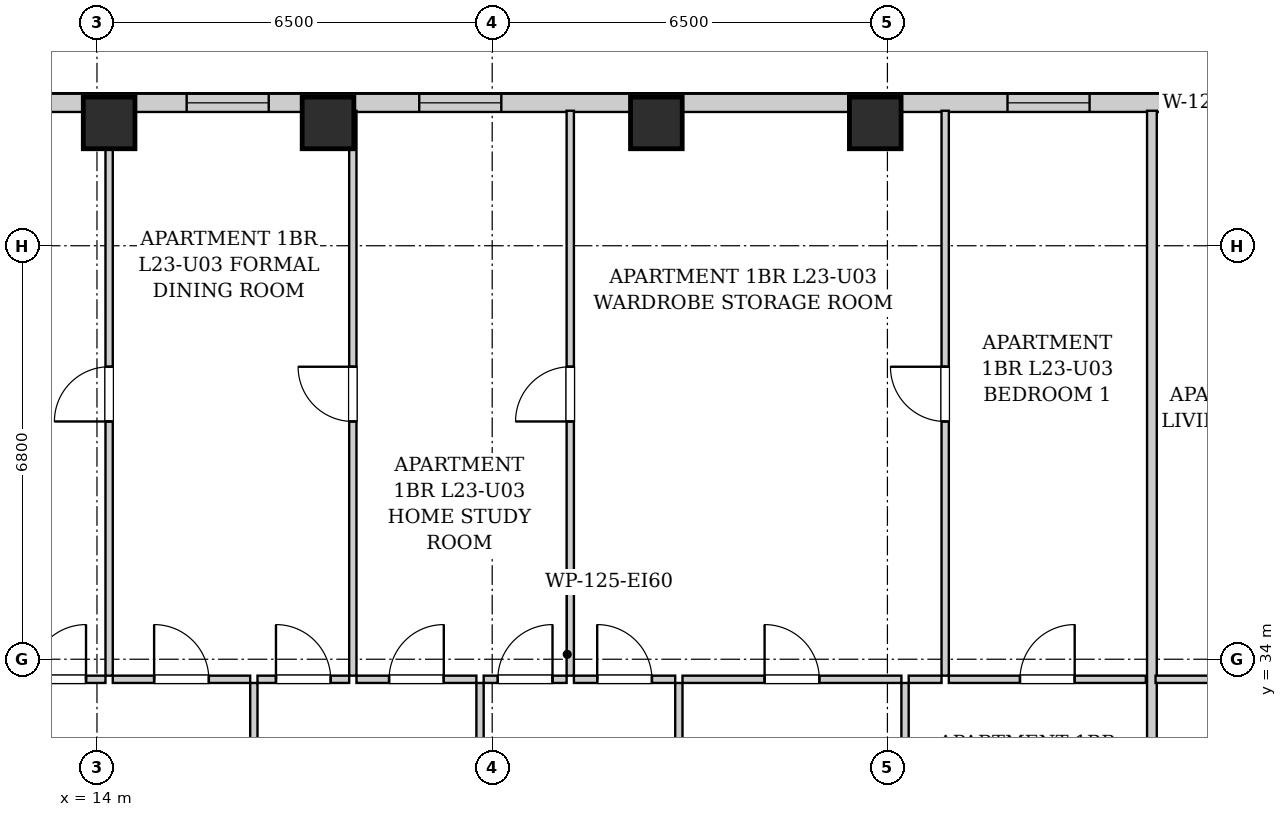
"""IFC4 building model, lengths in metres.
Left out: names, types, materials, properties, quantities, classifications, styles, units other than length and angle.
Written with IfcOpenShell. Run it as: python <this file> out.ifc"""

import sys

from ifc_helpers import new_model, si_unit, direction, frame, frame_2d, origin, origin_2d, place, context, subcontext, project, spatial, rectangle, extrude, element, fill, save


model = new_model("IFC4")
c1 = context("Model", 3, precision=1e-05, world=origin(), true_north=direction((0.0, 1.0)))
c2 = subcontext(c1, "Body", "Model", "MODEL_VIEW")
j1 = project(units=[si_unit("LENGTHUNIT", "METRE"), si_unit("PLANEANGLEUNIT", "RADIAN")], contexts=[c1])
p1 = place(None, origin())
s1 = spatial("IfcSite", under=j1, at=p1, CompositionType="ELEMENT")
p2 = place(p1, origin())
s2 = spatial("IfcBuilding", under=s1, at=p2, CompositionType="ELEMENT")
p3 = place(p2, frame((0.0, 0.0, 84.7)))
s3 = spatial("IfcBuildingStorey", under=s2, at=p3, CompositionType="ELEMENT", Elevation=84.7)
for number, where, z_axis, x_axis in (
    (1, (14.2, 42.82, 0.0), (0.0, 0.0, 1.0), (1.0, 0.0, 0.0)),
    (2, (17.8, 42.82, 0.0), (0.0, 0.0, 1.0), (1.0, 0.0, 0.0)),
    (3, (23.2, 42.82, 0.0), (0.0, 0.0, 1.0), (1.0, 0.0, 0.0)),
    (4, (26.8, 42.82, 0.0), (0.0, 0.0, 1.0), (1.0, 0.0, 0.0)),
):
    element("IfcColumn", number, at=place(p3, frame(where, z_axis=z_axis, x_axis=x_axis)), inside=s3, PredefinedType="COLUMN", context=c2, shape_type="SweptSolid", body=[
        extrude(rectangle(XDim=0.85, YDim=0.85, at=origin_2d()), origin(), (0.0, 0.0, 1.0), 3.2),
    ])
p4 = place(p3, frame((10.0, 43.15, 0.0), z_axis=(0.0, 0.0, 1.0), x_axis=(1.0, 0.0, 0.0)))
e5 = element("IfcWall", 5, at=p4, inside=s3, PredefinedType="SOLIDWALL", context=c2, shape_type="SweptSolid", body=[
    extrude(rectangle(XDim=22.5, YDim=0.3, at=frame_2d((11.25, 0.0))), origin(), (0.0, 0.0, 1.0), 2.94),
])
p5 = place(p4, frame((5.475, 0.0, 0.55)))
e6 = element("IfcOpeningElement", 6, at=p5, cuts=e5, PredefinedType="OPENING", context=c2, shape_type="SweptSolid", body=[
    extrude(rectangle(XDim=1.35, YDim=1.2, at=frame_2d((0.675, 0.6))), frame((0.0, 0.16, 0.0), z_axis=(0.0, -1.0, 0.0), x_axis=(1.0, 0.0, 0.0)), (0.0, 0.0, 1.0), 0.32),
])
p6 = place(p4, frame((9.3, 0.0, 0.55)))
e7 = element("IfcOpeningElement", 7, at=p6, cuts=e5, PredefinedType="OPENING", context=c2, shape_type="SweptSolid", body=[
    extrude(rectangle(XDim=1.35, YDim=1.2, at=frame_2d((0.675, 0.6))), frame((0.0, 0.16, 0.0), z_axis=(0.0, -1.0, 0.0), x_axis=(1.0, 0.0, 0.0)), (0.0, 0.0, 1.0), 0.32),
])
p7 = place(p4, frame((18.975, 0.0, 0.55)))
e8 = element("IfcOpeningElement", 8, at=p7, cuts=e5, PredefinedType="OPENING", context=c2, shape_type="SweptSolid", body=[
    extrude(rectangle(XDim=1.35, YDim=1.2, at=frame_2d((0.675, 0.6))), frame((0.0, 0.16, 0.0), z_axis=(0.0, -1.0, 0.0), x_axis=(1.0, 0.0, 0.0)), (0.0, 0.0, 1.0), 0.32),
])
p8 = place(p4, frame((21.59, 0.0, 0.55)))
e9 = element("IfcOpeningElement", 9, at=p8, cuts=e5, PredefinedType="OPENING", context=c2, shape_type="SweptSolid", body=[
    extrude(rectangle(XDim=0.68, YDim=1.2, at=frame_2d((0.34, 0.6))), frame((0.0, 0.16, 0.0), z_axis=(0.0, -1.0, 0.0), x_axis=(1.0, 0.0, 0.0)), (0.0, 0.0, 1.0), 0.32),
])
p9 = place(p3, frame((16.58, 30.76, 0.0), z_axis=(0.0, 0.0, 1.0), x_axis=(0.0, 1.0, 0.0)))
e10 = element("IfcWall", 10, at=p9, inside=s3, PredefinedType="PARTITIONING", context=c2, shape_type="SweptSolid", body=[
    extrude(rectangle(XDim=2.85, YDim=0.12, at=frame_2d((1.425, 0.0))), origin(), (0.0, 0.0, 1.0), 2.94),
])
p10 = place(p9, frame((0.975, 0.0, 0.0)))
e11 = element("IfcOpeningElement", 11, at=p10, cuts=e10, PredefinedType="OPENING", context=c2, shape_type="SweptSolid", body=[
    extrude(rectangle(XDim=0.9, YDim=2.05, at=frame_2d((0.45, 1.025))), frame((0.0, 0.07, 0.0), z_axis=(0.0, -1.0, 0.0), x_axis=(1.0, 0.0, 0.0)), (0.0, 0.0, 1.0), 0.14),
])
p11 = place(p3, frame((12.6, 33.67, 0.0), z_axis=(0.0, 0.0, 1.0), x_axis=(1.0, 0.0, 0.0)))
e12 = element("IfcWall", 12, at=p11, inside=s3, PredefinedType="PARTITIONING", context=c2, shape_type="SweptSolid", body=[
    extrude(rectangle(XDim=1.54, YDim=0.12, at=frame_2d((0.77, 0.0))), origin(), (0.0, 0.0, 1.0), 2.94),
])
p12 = place(p11, frame((0.32, 0.0, 0.0)))
e13 = element("IfcOpeningElement", 13, at=p12, cuts=e12, PredefinedType="OPENING", context=c2, shape_type="SweptSolid", body=[
    extrude(rectangle(XDim=0.9, YDim=2.05, at=frame_2d((0.45, 1.025))), frame((0.0, 0.07, 0.0), z_axis=(0.0, -1.0, 0.0), x_axis=(1.0, 0.0, 0.0)), (0.0, 0.0, 1.0), 0.14),
])
p13 = place(p3, frame((14.26, 33.67, 0.0), z_axis=(0.0, 0.0, 1.0), x_axis=(1.0, 0.0, 0.0)))
e14 = element("IfcWall", 14, at=p13, inside=s3, PredefinedType="PARTITIONING", context=c2, shape_type="SweptSolid", body=[
    extrude(rectangle(XDim=2.26, YDim=0.12, at=frame_2d((1.13, 0.0))), origin(), (0.0, 0.0, 1.0), 2.94),
])
p14 = place(p13, frame((0.68, 0.0, 0.0)))
e15 = element("IfcOpeningElement", 15, at=p14, cuts=e14, PredefinedType="OPENING", context=c2, shape_type="SweptSolid", body=[
    extrude(rectangle(XDim=0.9, YDim=2.05, at=frame_2d((0.45, 1.025))), frame((0.0, 0.07, 0.0), z_axis=(0.0, -1.0, 0.0), x_axis=(1.0, 0.0, 0.0)), (0.0, 0.0, 1.0), 0.14),
])
p15 = place(p3, frame((20.3, 30.76, 0.0), z_axis=(0.0, 0.0, 1.0), x_axis=(0.0, 1.0, 0.0)))
e16 = element("IfcWall", 16, at=p15, inside=s3, PredefinedType="PARTITIONING", context=c2, shape_type="SweptSolid", body=[
    extrude(rectangle(XDim=2.85, YDim=0.12, at=frame_2d((1.425, 0.0))), origin(), (0.0, 0.0, 1.0), 2.94),
])
p16 = place(p15, frame((0.975, 0.0, 0.0)))
e17 = element("IfcOpeningElement", 17, at=p16, cuts=e16, PredefinedType="OPENING", context=c2, shape_type="SweptSolid", body=[
    extrude(rectangle(XDim=0.9, YDim=2.05, at=frame_2d((0.45, 1.025))), frame((0.0, 0.07, 0.0), z_axis=(0.0, -1.0, 0.0), x_axis=(1.0, 0.0, 0.0)), (0.0, 0.0, 1.0), 0.14),
])
p17 = place(p3, frame((16.64, 33.67, 0.0), z_axis=(0.0, 0.0, 1.0), x_axis=(1.0, 0.0, 0.0)))
e18 = element("IfcWall", 18, at=p17, inside=s3, PredefinedType="PARTITIONING", context=c2, shape_type="SweptSolid", body=[
    extrude(rectangle(XDim=1.508, YDim=0.12, at=frame_2d((0.754, 0.0))), origin(), (0.0, 0.0, 1.0), 2.94),
])
p18 = place(p17, frame((0.304, 0.0, 0.0)))
e19 = element("IfcOpeningElement", 19, at=p18, cuts=e18, PredefinedType="OPENING", context=c2, shape_type="SweptSolid", body=[
    extrude(rectangle(XDim=0.9, YDim=2.05, at=frame_2d((0.45, 1.025))), frame((0.0, 0.07, 0.0), z_axis=(0.0, -1.0, 0.0), x_axis=(1.0, 0.0, 0.0)), (0.0, 0.0, 1.0), 0.14),
])
p19 = place(p3, frame((18.268, 33.67, 0.0), z_axis=(0.0, 0.0, 1.0), x_axis=(1.0, 0.0, 0.0)))
e20 = element("IfcWall", 20, at=p19, inside=s3, PredefinedType="PARTITIONING", context=c2, shape_type="SweptSolid", body=[
    extrude(rectangle(XDim=1.972, YDim=0.12, at=frame_2d((0.986, 0.0))), origin(), (0.0, 0.0, 1.0), 2.94),
])
p20 = place(p19, frame((0.536, 0.0, 0.0)))
e21 = element("IfcOpeningElement", 21, at=p20, cuts=e20, PredefinedType="OPENING", context=c2, shape_type="SweptSolid", body=[
    extrude(rectangle(XDim=0.9, YDim=2.05, at=frame_2d((0.45, 1.025))), frame((0.0, 0.07, 0.0), z_axis=(0.0, -1.0, 0.0), x_axis=(1.0, 0.0, 0.0)), (0.0, 0.0, 1.0), 0.14),
])
p21 = place(p3, frame((23.57, 30.76, 0.0), z_axis=(0.0, 0.0, 1.0), x_axis=(0.0, 1.0, 0.0)))
e22 = element("IfcWall", 22, at=p21, inside=s3, PredefinedType="PARTITIONING", context=c2, shape_type="SweptSolid", body=[
    extrude(rectangle(XDim=2.85, YDim=0.12, at=frame_2d((1.425, 0.0))), origin(), (0.0, 0.0, 1.0), 2.94),
])
p22 = place(p21, frame((0.975, 0.0, 0.0)))
e23 = element("IfcOpeningElement", 23, at=p22, cuts=e22, PredefinedType="OPENING", context=c2, shape_type="SweptSolid", body=[
    extrude(rectangle(XDim=0.9, YDim=2.05, at=frame_2d((0.45, 1.025))), frame((0.0, 0.07, 0.0), z_axis=(0.0, -1.0, 0.0), x_axis=(1.0, 0.0, 0.0)), (0.0, 0.0, 1.0), 0.14),
])
p23 = place(p3, frame((20.36, 33.67, 0.0), z_axis=(0.0, 0.0, 1.0), x_axis=(1.0, 0.0, 0.0)))
e24 = element("IfcWall", 24, at=p23, inside=s3, PredefinedType="PARTITIONING", context=c2, shape_type="SweptSolid", body=[
    extrude(rectangle(XDim=1.364, YDim=0.12, at=frame_2d((0.682, 0.0))), origin(), (0.0, 0.0, 1.0), 2.94),
])
p24 = place(p23, frame((0.232, 0.0, 0.0)))
e25 = element("IfcOpeningElement", 25, at=p24, cuts=e24, PredefinedType="OPENING", context=c2, shape_type="SweptSolid", body=[
    extrude(rectangle(XDim=0.9, YDim=2.05, at=frame_2d((0.45, 1.025))), frame((0.0, 0.07, 0.0), z_axis=(0.0, -1.0, 0.0), x_axis=(1.0, 0.0, 0.0)), (0.0, 0.0, 1.0), 0.14),
])
p25 = place(p3, frame((21.844, 33.67, 0.0), z_axis=(0.0, 0.0, 1.0), x_axis=(1.0, 0.0, 0.0)))
e26 = element("IfcWall", 26, at=p25, inside=s3, PredefinedType="PARTITIONING", context=c2, shape_type="SweptSolid", body=[
    extrude(rectangle(XDim=1.666, YDim=0.12, at=frame_2d((0.833, 0.0))), origin(), (0.0, 0.0, 1.0), 2.94),
])
p26 = place(p25, frame((0.383, 0.0, 0.0)))
e27 = element("IfcOpeningElement", 27, at=p26, cuts=e26, PredefinedType="OPENING", context=c2, shape_type="SweptSolid", body=[
    extrude(rectangle(XDim=0.9, YDim=2.05, at=frame_2d((0.45, 1.025))), frame((0.0, 0.07, 0.0), z_axis=(0.0, -1.0, 0.0), x_axis=(1.0, 0.0, 0.0)), (0.0, 0.0, 1.0), 0.14),
])
p27 = place(p3, frame((27.29, 30.76, 0.0), z_axis=(0.0, 0.0, 1.0), x_axis=(0.0, 1.0, 0.0)))
e28 = element("IfcWall", 28, at=p27, inside=s3, PredefinedType="PARTITIONING", context=c2, shape_type="SweptSolid", body=[
    extrude(rectangle(XDim=2.85, YDim=0.12, at=frame_2d((1.425, 0.0))), origin(), (0.0, 0.0, 1.0), 2.94),
])
p28 = place(p27, frame((0.975, 0.0, 0.0)))
e29 = element("IfcOpeningElement", 29, at=p28, cuts=e28, PredefinedType="OPENING", context=c2, shape_type="SweptSolid", body=[
    extrude(rectangle(XDim=0.9, YDim=2.05, at=frame_2d((0.45, 1.025))), frame((0.0, 0.07, 0.0), z_axis=(0.0, -1.0, 0.0), x_axis=(1.0, 0.0, 0.0)), (0.0, 0.0, 1.0), 0.14),
])
p29 = place(p3, frame((23.63, 33.67, 0.0), z_axis=(0.0, 0.0, 1.0), x_axis=(1.0, 0.0, 0.0)))
e30 = element("IfcWall", 30, at=p29, inside=s3, PredefinedType="PARTITIONING", context=c2, shape_type="SweptSolid", body=[
    extrude(rectangle(XDim=3.6, YDim=0.12, at=frame_2d((1.8, 0.0))), origin(), (0.0, 0.0, 1.0), 2.94),
])
p30 = place(p29, frame((1.35, 0.0, 0.0)))
e31 = element("IfcOpeningElement", 31, at=p30, cuts=e30, PredefinedType="OPENING", context=c2, shape_type="SweptSolid", body=[
    extrude(rectangle(XDim=0.9, YDim=2.05, at=frame_2d((0.45, 1.025))), frame((0.0, 0.07, 0.0), z_axis=(0.0, -1.0, 0.0), x_axis=(1.0, 0.0, 0.0)), (0.0, 0.0, 1.0), 0.14),
])
p31 = place(p3, frame((27.35, 33.67, 0.0), z_axis=(0.0, 0.0, 1.0), x_axis=(1.0, 0.0, 0.0)))
e32 = element("IfcWall", 32, at=p31, inside=s3, PredefinedType="PARTITIONING", context=c2, shape_type="SweptSolid", body=[
    extrude(rectangle(XDim=0.54, YDim=0.12, at=frame_2d((0.27, 0.0))), origin(), (0.0, 0.0, 1.0), 2.94),
])
p32 = place(p3, frame((28.01, 33.67, 0.0), z_axis=(0.0, 0.0, 1.0), x_axis=(1.0, 0.0, 0.0)))
e33 = element("IfcWall", 33, at=p32, inside=s3, PredefinedType="PARTITIONING", context=c2, shape_type="SweptSolid", body=[
    extrude(rectangle(XDim=3.24, YDim=0.12, at=frame_2d((1.62, 0.0))), origin(), (0.0, 0.0, 1.0), 2.94),
])
p33 = place(p32, frame((1.17, 0.0, 0.0)))
e34 = element("IfcOpeningElement", 34, at=p33, cuts=e33, PredefinedType="OPENING", context=c2, shape_type="SweptSolid", body=[
    extrude(rectangle(XDim=0.9, YDim=2.05, at=frame_2d((0.45, 1.025))), frame((0.0, 0.07, 0.0), z_axis=(0.0, -1.0, 0.0), x_axis=(1.0, 0.0, 0.0)), (0.0, 0.0, 1.0), 0.14),
])
p34 = place(p3, frame((14.2, 33.73, 0.0), z_axis=(0.0, 0.0, 1.0), x_axis=(0.0, 1.0, 0.0)))
e35 = element("IfcWall", 35, at=p34, inside=s3, PredefinedType="PARTITIONING", context=c2, shape_type="SweptSolid", body=[
    extrude(rectangle(XDim=9.29, YDim=0.12, at=frame_2d((4.645, 0.0))), origin(), (0.0, 0.0, 1.0), 2.94),
])
p35 = place(p34, frame((4.18, 0.0, 0.0)))
e36 = element("IfcOpeningElement", 36, at=p35, cuts=e35, PredefinedType="OPENING", context=c2, shape_type="SweptSolid", body=[
    extrude(rectangle(XDim=0.9, YDim=2.05, at=frame_2d((0.45, 1.025))), frame((0.0, 0.07, 0.0), z_axis=(0.0, -1.0, 0.0), x_axis=(1.0, 0.0, 0.0)), (0.0, 0.0, 1.0), 0.14),
])
p36 = place(p3, frame((18.208, 33.73, 0.0), z_axis=(0.0, 0.0, 1.0), x_axis=(0.0, 1.0, 0.0)))
e37 = element("IfcWall", 37, at=p36, inside=s3, PredefinedType="PARTITIONING", context=c2, shape_type="SweptSolid", body=[
    extrude(rectangle(XDim=9.29, YDim=0.12, at=frame_2d((4.645, 0.0))), origin(), (0.0, 0.0, 1.0), 2.94),
])
p37 = place(p36, frame((4.18, 0.0, 0.0)))
e38 = element("IfcOpeningElement", 38, at=p37, cuts=e37, PredefinedType="OPENING", context=c2, shape_type="SweptSolid", body=[
    extrude(rectangle(XDim=0.9, YDim=2.05, at=frame_2d((0.45, 1.025))), frame((0.0, 0.07, 0.0), z_axis=(0.0, -1.0, 0.0), x_axis=(1.0, 0.0, 0.0)), (0.0, 0.0, 1.0), 0.14),
])
p38 = place(p3, frame((21.784, 33.73, 0.0), z_axis=(0.0, 0.0, 1.0), x_axis=(0.0, 1.0, 0.0)))
e39 = element("IfcWall", 39, at=p38, inside=s3, PredefinedType="PARTITIONING", context=c2, shape_type="SweptSolid", body=[
    extrude(rectangle(XDim=9.29, YDim=0.12, at=frame_2d((4.645, 0.0))), origin(), (0.0, 0.0, 1.0), 2.94),
])
p39 = place(p38, frame((4.18, 0.0, 0.0)))
e40 = element("IfcOpeningElement", 40, at=p39, cuts=e39, PredefinedType="OPENING", context=c2, shape_type="SweptSolid", body=[
    extrude(rectangle(XDim=0.9, YDim=2.05, at=frame_2d((0.45, 1.025))), frame((0.0, 0.07, 0.0), z_axis=(0.0, -1.0, 0.0), x_axis=(1.0, 0.0, 0.0)), (0.0, 0.0, 1.0), 0.14),
])
p40 = place(p3, frame((27.95, 33.73, 0.0), z_axis=(0.0, 0.0, 1.0), x_axis=(0.0, 1.0, 0.0)))
e41 = element("IfcWall", 41, at=p40, inside=s3, PredefinedType="PARTITIONING", context=c2, shape_type="SweptSolid", body=[
    extrude(rectangle(XDim=9.29, YDim=0.12, at=frame_2d((4.645, 0.0))), origin(), (0.0, 0.0, 1.0), 2.94),
])
p41 = place(p40, frame((4.18, 0.0, 0.0)))
e42 = element("IfcOpeningElement", 42, at=p41, cuts=e41, PredefinedType="OPENING", context=c2, shape_type="SweptSolid", body=[
    extrude(rectangle(XDim=0.9, YDim=2.05, at=frame_2d((0.45, 1.025))), frame((0.0, 0.07, 0.0), z_axis=(0.0, -1.0, 0.0), x_axis=(1.0, 0.0, 0.0)), (0.0, 0.0, 1.0), 0.14),
])
p42 = place(p3, frame((31.35, 30.76, 0.0), z_axis=(0.0, 0.0, 1.0), x_axis=(0.0, 1.0, 0.0)))
e43 = element("IfcWall", 43, at=p42, inside=s3, PredefinedType="PARTITIONING", context=c2, shape_type="SweptSolid", body=[
    extrude(rectangle(XDim=12.26, YDim=0.16, at=frame_2d((6.13, 0.0))), origin(), (0.0, 0.0, 1.0), 2.94),
])
p43 = place(p3, frame((31.41, 33.67, 0.0), z_axis=(0.0, 0.0, 1.0), x_axis=(1.0, 0.0, 0.0)))
e44 = element("IfcWall", 44, at=p43, inside=s3, PredefinedType="PARTITIONING", context=c2, shape_type="SweptSolid", body=[
    extrude(rectangle(XDim=2.4, YDim=0.12, at=frame_2d((1.2, 0.0))), origin(), (0.0, 0.0, 1.0), 2.94),
])
p44 = place(p12, origin())
e45 = element("IfcDoor", 45, at=p44, inside=s3, OperationType="SINGLE_SWING_RIGHT", PredefinedType="DOOR", context=c2, shape_type="SweptSolid", body=[
    extrude(rectangle(XDim=0.9, YDim=2.05, at=frame_2d((0.45, 1.025))), frame((0.0, 0.025, 0.0), z_axis=(0.0, -1.0, 0.0), x_axis=(1.0, 0.0, 0.0)), (0.0, 0.0, 1.0), 0.05),
])
fill(e13, e45)
p45 = place(p14, origin())
e46 = element("IfcDoor", 46, at=p45, inside=s3, OperationType="SINGLE_SWING_LEFT", PredefinedType="DOOR", context=c2, shape_type="SweptSolid", body=[
    extrude(rectangle(XDim=0.9, YDim=2.05, at=frame_2d((0.45, 1.025))), frame((0.0, 0.025, 0.0), z_axis=(0.0, -1.0, 0.0), x_axis=(1.0, 0.0, 0.0)), (0.0, 0.0, 1.0), 0.05),
])
fill(e15, e46)
p46 = place(p18, origin())
e47 = element("IfcDoor", 47, at=p46, inside=s3, OperationType="SINGLE_SWING_LEFT", PredefinedType="DOOR", context=c2, shape_type="SweptSolid", body=[
    extrude(rectangle(XDim=0.9, YDim=2.05, at=frame_2d((0.45, 1.025))), frame((0.0, 0.025, 0.0), z_axis=(0.0, -1.0, 0.0), x_axis=(1.0, 0.0, 0.0)), (0.0, 0.0, 1.0), 0.05),
])
fill(e19, e47)
p47 = place(p20, origin())
e48 = element("IfcDoor", 48, at=p47, inside=s3, OperationType="SINGLE_SWING_RIGHT", PredefinedType="DOOR", context=c2, shape_type="SweptSolid", body=[
    extrude(rectangle(XDim=0.9, YDim=2.05, at=frame_2d((0.45, 1.025))), frame((0.0, 0.025, 0.0), z_axis=(0.0, -1.0, 0.0), x_axis=(1.0, 0.0, 0.0)), (0.0, 0.0, 1.0), 0.05),
])
fill(e21, e48)
p48 = place(p24, origin())
e49 = element("IfcDoor", 49, at=p48, inside=s3, OperationType="SINGLE_SWING_RIGHT", PredefinedType="DOOR", context=c2, shape_type="SweptSolid", body=[
    extrude(rectangle(XDim=0.9, YDim=2.05, at=frame_2d((0.45, 1.025))), frame((0.0, 0.025, 0.0), z_axis=(0.0, -1.0, 0.0), x_axis=(1.0, 0.0, 0.0)), (0.0, 0.0, 1.0), 0.05),
])
fill(e25, e49)
p49 = place(p26, origin())
e50 = element("IfcDoor", 50, at=p49, inside=s3, OperationType="SINGLE_SWING_LEFT", PredefinedType="DOOR", context=c2, shape_type="SweptSolid", body=[
    extrude(rectangle(XDim=0.9, YDim=2.05, at=frame_2d((0.45, 1.025))), frame((0.0, 0.025, 0.0), z_axis=(0.0, -1.0, 0.0), x_axis=(1.0, 0.0, 0.0)), (0.0, 0.0, 1.0), 0.05),
])
fill(e27, e50)
p50 = place(p30, origin())
e51 = element("IfcDoor", 51, at=p50, inside=s3, OperationType="SINGLE_SWING_LEFT", PredefinedType="DOOR", context=c2, shape_type="SweptSolid", body=[
    extrude(rectangle(XDim=0.9, YDim=2.05, at=frame_2d((0.45, 1.025))), frame((0.0, 0.025, 0.0), z_axis=(0.0, -1.0, 0.0), x_axis=(1.0, 0.0, 0.0)), (0.0, 0.0, 1.0), 0.05),
])
fill(e31, e51)
p51 = place(p33, origin())
e52 = element("IfcDoor", 52, at=p51, inside=s3, OperationType="SINGLE_SWING_RIGHT", PredefinedType="DOOR", context=c2, shape_type="SweptSolid", body=[
    extrude(rectangle(XDim=0.9, YDim=2.05, at=frame_2d((0.45, 1.025))), frame((0.0, 0.025, 0.0), z_axis=(0.0, -1.0, 0.0), x_axis=(1.0, 0.0, 0.0)), (0.0, 0.0, 1.0), 0.05),
])
fill(e34, e52)
p52 = place(p35, origin())
e53 = element("IfcDoor", 53, at=p52, inside=s3, OperationType="SINGLE_SWING_LEFT", PredefinedType="DOOR", context=c2, shape_type="SweptSolid", body=[
    extrude(rectangle(XDim=0.9, YDim=2.05, at=frame_2d((0.45, 1.025))), frame((0.0, 0.025, 0.0), z_axis=(0.0, -1.0, 0.0), x_axis=(1.0, 0.0, 0.0)), (0.0, 0.0, 1.0), 0.05),
])
fill(e36, e53)
p53 = place(p37, origin())
e54 = element("IfcDoor", 54, at=p53, inside=s3, OperationType="SINGLE_SWING_RIGHT", PredefinedType="DOOR", context=c2, shape_type="SweptSolid", body=[
    extrude(rectangle(XDim=0.9, YDim=2.05, at=frame_2d((0.45, 1.025))), frame((0.0, 0.025, 0.0), z_axis=(0.0, -1.0, 0.0), x_axis=(1.0, 0.0, 0.0)), (0.0, 0.0, 1.0), 0.05),
])
fill(e38, e54)
p54 = place(p39, origin())
e55 = element("IfcDoor", 55, at=p54, inside=s3, OperationType="SINGLE_SWING_LEFT", PredefinedType="DOOR", context=c2, shape_type="SweptSolid", body=[
    extrude(rectangle(XDim=0.9, YDim=2.05, at=frame_2d((0.45, 1.025))), frame((0.0, 0.025, 0.0), z_axis=(0.0, -1.0, 0.0), x_axis=(1.0, 0.0, 0.0)), (0.0, 0.0, 1.0), 0.05),
])
fill(e40, e55)
p55 = place(p41, origin())
e56 = element("IfcDoor", 56, at=p55, inside=s3, OperationType="SINGLE_SWING_RIGHT", PredefinedType="DOOR", context=c2, shape_type="SweptSolid", body=[
    extrude(rectangle(XDim=0.9, YDim=2.05, at=frame_2d((0.45, 1.025))), frame((0.0, 0.025, 0.0), z_axis=(0.0, -1.0, 0.0), x_axis=(1.0, 0.0, 0.0)), (0.0, 0.0, 1.0), 0.05),
])
fill(e42, e56)
p56 = place(p5, origin())
e57 = element("IfcWindow", 57, at=p56, inside=s3, PartitioningType="SINGLE_PANEL", PredefinedType="WINDOW", context=c2, shape_type="SweptSolid", body=[
    extrude(rectangle(XDim=1.35, YDim=1.2, at=frame_2d((0.675, 0.6))), frame((0.0, 0.03, 0.0), z_axis=(0.0, -1.0, 0.0), x_axis=(1.0, 0.0, 0.0)), (0.0, 0.0, 1.0), 0.06),
])
fill(e6, e57)
p57 = place(p6, origin())
e58 = element("IfcWindow", 58, at=p57, inside=s3, PartitioningType="SINGLE_PANEL", PredefinedType="WINDOW", context=c2, shape_type="SweptSolid", body=[
    extrude(rectangle(XDim=1.35, YDim=1.2, at=frame_2d((0.675, 0.6))), frame((0.0, 0.03, 0.0), z_axis=(0.0, -1.0, 0.0), x_axis=(1.0, 0.0, 0.0)), (0.0, 0.0, 1.0), 0.06),
])
fill(e7, e58)
p58 = place(p7, origin())
e59 = element("IfcWindow", 59, at=p58, inside=s3, PartitioningType="SINGLE_PANEL", PredefinedType="WINDOW", context=c2, shape_type="SweptSolid", body=[
    extrude(rectangle(XDim=1.35, YDim=1.2, at=frame_2d((0.675, 0.6))), frame((0.0, 0.03, 0.0), z_axis=(0.0, -1.0, 0.0), x_axis=(1.0, 0.0, 0.0)), (0.0, 0.0, 1.0), 0.06),
])
fill(e8, e59)
p59 = place(p8, origin())
e60 = element("IfcWindow", 60, at=p59, inside=s3, PartitioningType="SINGLE_PANEL", PredefinedType="WINDOW", context=c2, shape_type="SweptSolid", body=[
    extrude(rectangle(XDim=0.68, YDim=1.2, at=frame_2d((0.34, 0.6))), frame((0.0, 0.03, 0.0), z_axis=(0.0, -1.0, 0.0), x_axis=(1.0, 0.0, 0.0)), (0.0, 0.0, 1.0), 0.06),
])
fill(e9, e60)
save(model, sys.argv[1])
